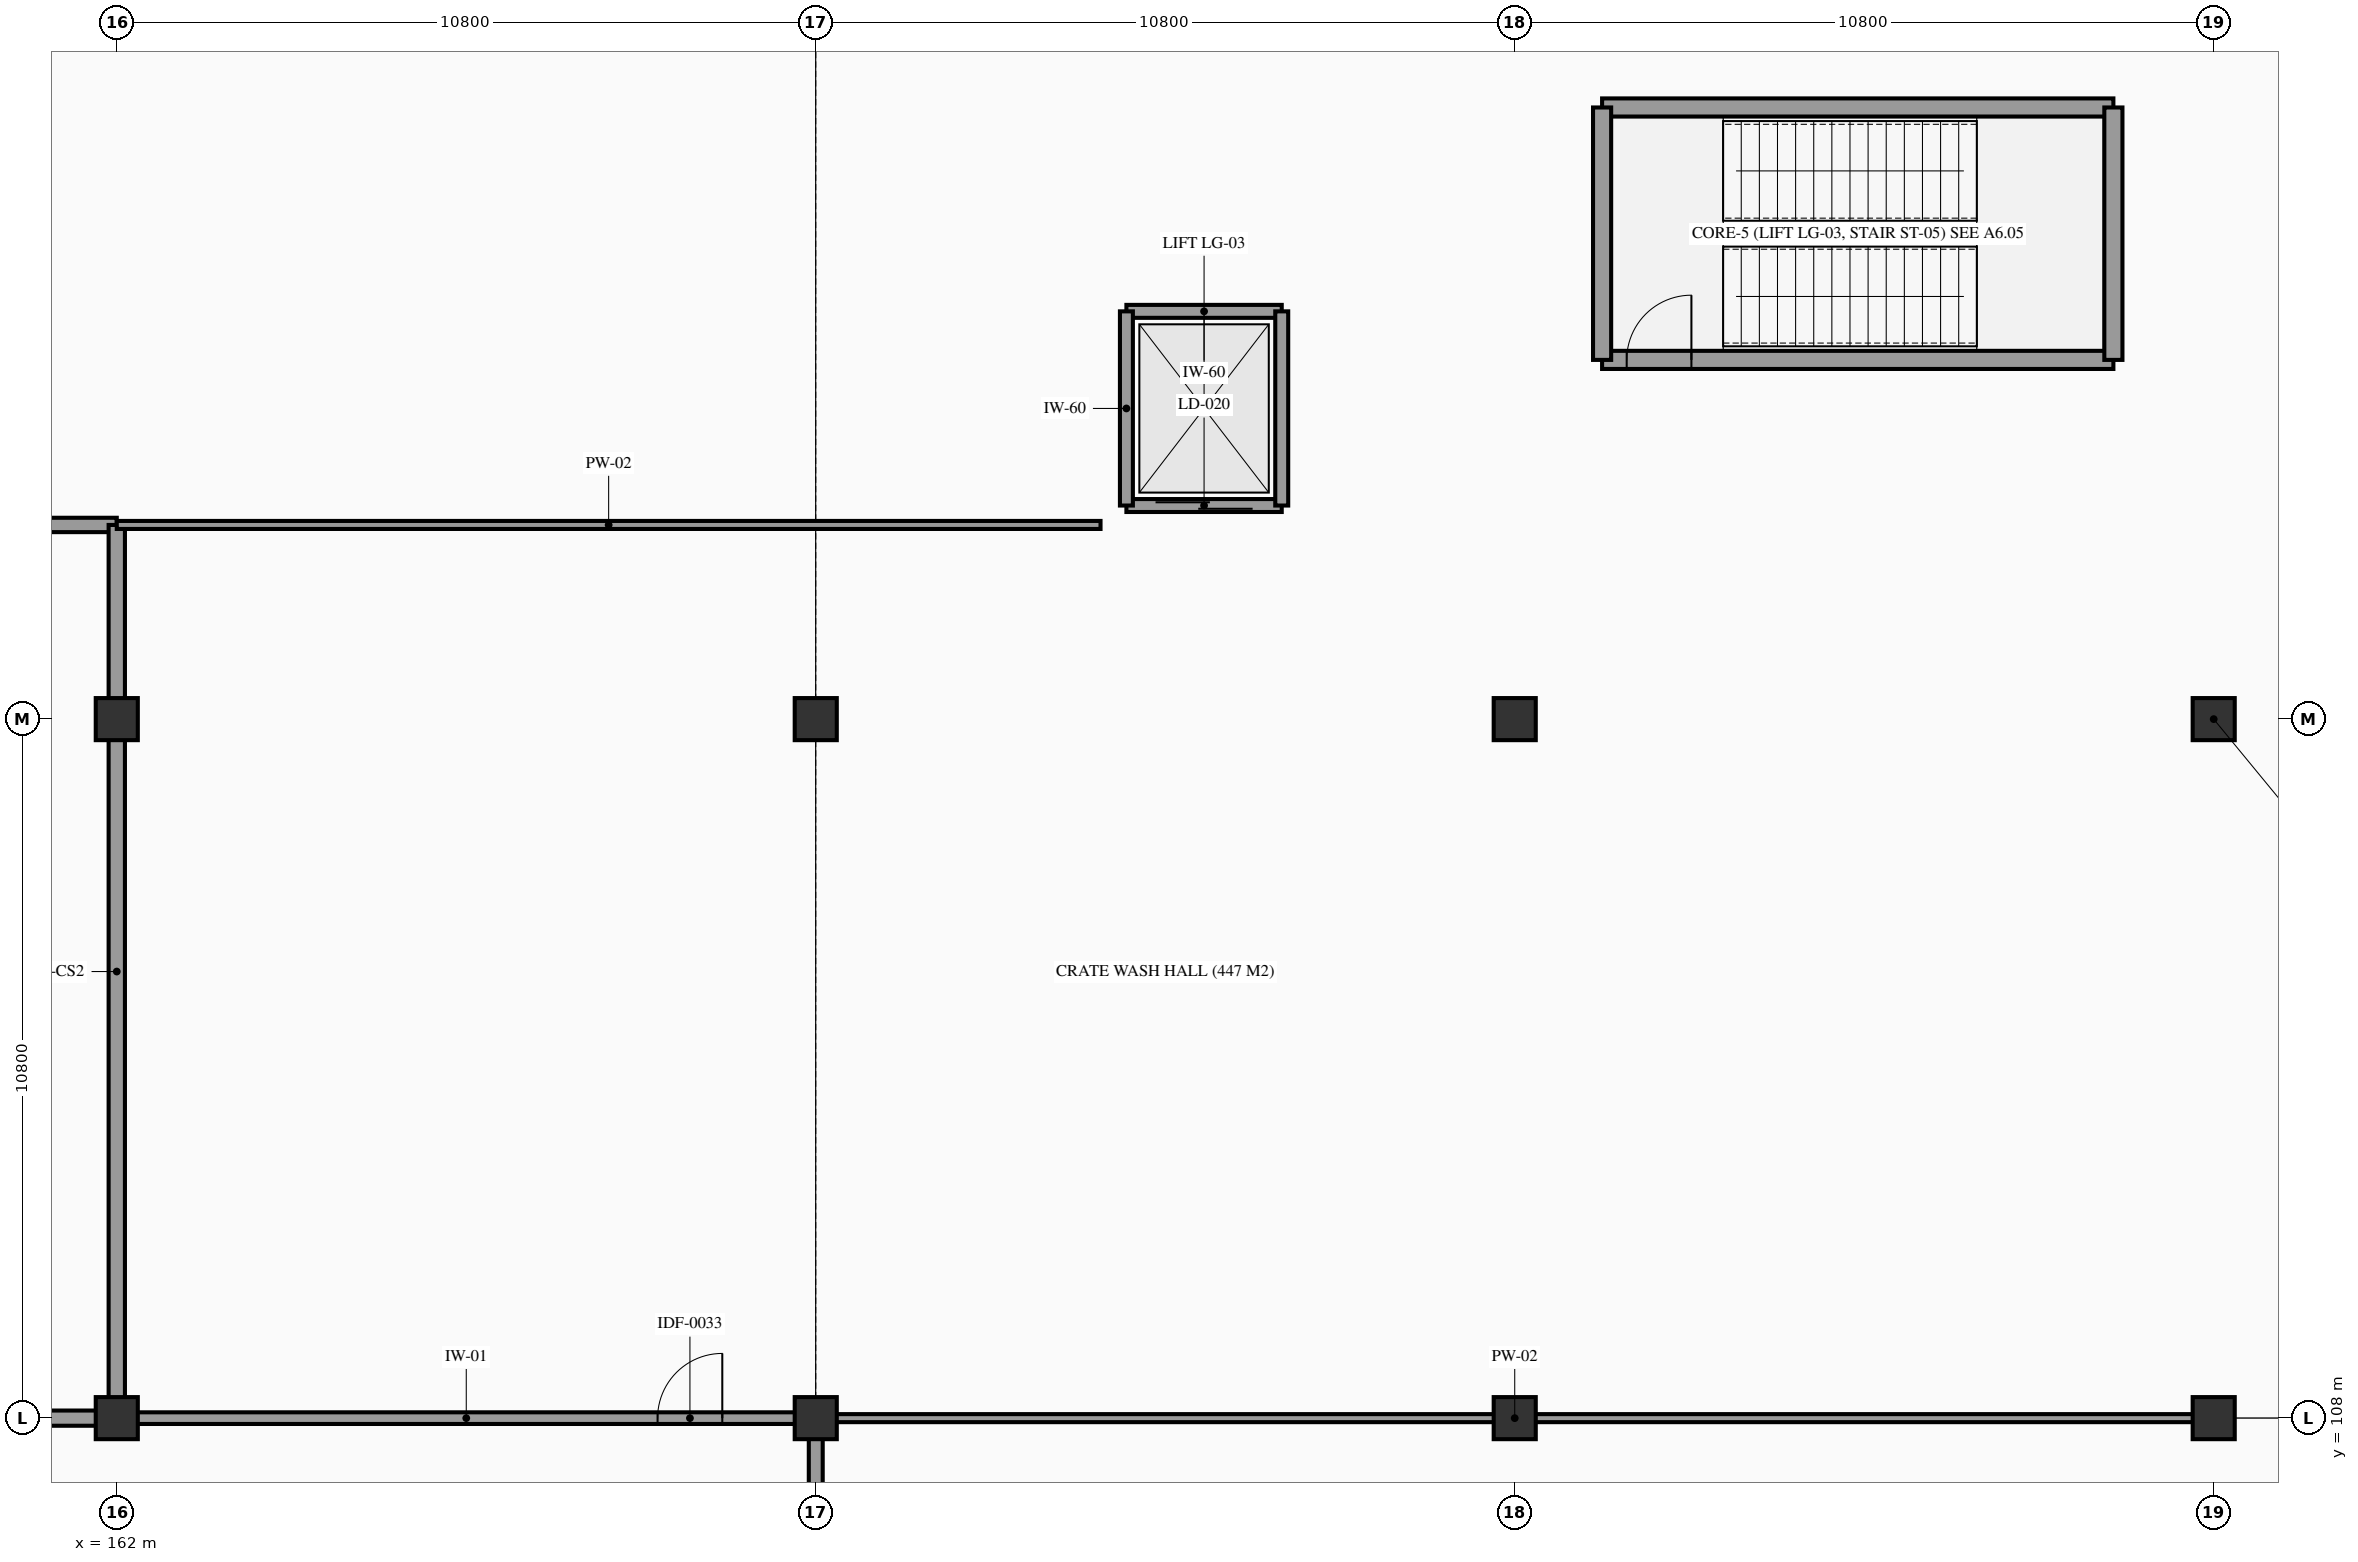
"""IFC4 building model, lengths in metres.
Left out: names, types, materials, properties, quantities, classifications, styles, units other than length and angle.
Written with IfcOpenShell. Run it as: python <this file> out.ifc"""

import sys

from ifc_helpers import new_model, si_unit, direction, frame, frame_2d, origin, origin_2d, place, context, subcontext, project, spatial, rectangle, extrude, element, fill, save


model = new_model("IFC4")
c1 = context("Model", 3, precision=1e-05, world=origin(), true_north=direction((0.0, 1.0)))
c2 = subcontext(c1, "Body", "Model", "MODEL_VIEW")
j1 = project(units=[si_unit("LENGTHUNIT", "METRE"), si_unit("PLANEANGLEUNIT", "RADIAN")], contexts=[c1])
p1 = place(None, origin())
s1 = spatial("IfcSite", under=j1, at=p1, CompositionType="ELEMENT")
p2 = place(p1, origin())
s2 = spatial("IfcBuilding", under=s1, at=p2, CompositionType="ELEMENT")
p3 = place(p2, origin())
s3 = spatial("IfcBuildingStorey", under=s2, at=p3, CompositionType="ELEMENT", Elevation=0.0)
for number, where, z_axis, x_axis in (
    (1, (162.0, 108.0, -1.2), (0.0, 0.0, 1.0), (1.0, 0.0, 0.0)),
    (2, (162.0, 118.8, -1.2), (0.0, 0.0, 1.0), (1.0, 0.0, 0.0)),
    (3, (172.8, 108.0, -1.2), (0.0, 0.0, 1.0), (1.0, 0.0, 0.0)),
    (4, (172.8, 118.8, -1.2), (0.0, 0.0, 1.0), (1.0, 0.0, 0.0)),
    (5, (183.6, 108.0, -1.2), (0.0, 0.0, 1.0), (1.0, 0.0, 0.0)),
    (6, (183.6, 118.8, -1.2), (0.0, 0.0, 1.0), (1.0, 0.0, 0.0)),
    (7, (194.4, 108.0, -1.2), (0.0, 0.0, 1.0), (1.0, 0.0, 0.0)),
    (8, (194.4, 118.8, -1.2), (0.0, 0.0, 1.0), (1.0, 0.0, 0.0)),
):
    element("IfcColumn", number, at=place(p3, frame(where, z_axis=z_axis, x_axis=x_axis)), inside=s3, PredefinedType="COLUMN", context=c2, shape_type="SweptSolid", body=[
        extrude(rectangle(XDim=0.65, YDim=0.65, at=origin_2d()), origin(), (0.0, 0.0, 1.0), 6.6),
    ])
p4 = place(p3, frame((184.95, 124.35, 0.0), z_axis=(0.0, 0.0, 1.0), x_axis=(1.0, 0.0, 0.0)))
e9 = element("IfcWall", 9, at=p4, inside=s3, PredefinedType="SHEAR", context=c2, shape_type="SweptSolid", body=[
    extrude(rectangle(XDim=7.9, YDim=0.28, at=frame_2d((3.95, 0.0))), origin(), (0.0, 0.0, 1.0), 5.4),
])
p5 = place(p4, frame((0.38, 0.0, 0.0)))
e10 = element("IfcOpeningElement", 10, at=p5, cuts=e9, PredefinedType="OPENING", context=c2, shape_type="SweptSolid", body=[
    extrude(rectangle(XDim=1.0, YDim=2.15, at=frame_2d((0.5, 1.075))), frame((0.0, 0.15, 0.0), z_axis=(0.0, -1.0, 0.0), x_axis=(1.0, 0.0, 0.0)), (0.0, 0.0, 1.0), 0.3),
])
p6 = place(p3, frame((184.95, 128.25, 0.0), z_axis=(0.0, 0.0, 1.0), x_axis=(1.0, 0.0, 0.0)))
e11 = element("IfcWall", 11, at=p6, inside=s3, PredefinedType="SHEAR", context=c2, shape_type="SweptSolid", body=[
    extrude(rectangle(XDim=7.9, YDim=0.28, at=frame_2d((3.95, 0.0))), origin(), (0.0, 0.0, 1.0), 5.4),
])
for number, where, z_axis, x_axis in (
    (12, (184.95, 124.35, 0.0), (0.0, 0.0, 1.0), (0.0, 1.0, 0.0)),
    (13, (192.85, 124.35, 0.0), (0.0, 0.0, 1.0), (0.0, 1.0, 0.0)),
):
    element("IfcWall", number, at=place(p3, frame(where, z_axis=z_axis, x_axis=x_axis)), inside=s3, PredefinedType="SHEAR", context=c2, shape_type="SweptSolid", body=[
        extrude(rectangle(XDim=3.9, YDim=0.28, at=frame_2d((1.95, 0.0))), origin(), (0.0, 0.0, 1.0), 5.4),
    ])
p7 = place(p3, frame((177.6, 122.1, 0.0), z_axis=(0.0, 0.0, 1.0), x_axis=(1.0, 0.0, 0.0)))
e14 = element("IfcWall", 14, at=p7, inside=s3, PredefinedType="SOLIDWALL", context=c2, shape_type="SweptSolid", body=[
    extrude(rectangle(XDim=2.4, YDim=0.2, at=frame_2d((1.2, 0.0))), origin(), (0.0, 0.0, 1.0), 4.22),
])
p8 = place(p7, frame((0.45, 0.0, 0.0)))
e15 = element("IfcOpeningElement", 15, at=p8, cuts=e14, PredefinedType="OPENING", context=c2, shape_type="SweptSolid", body=[
    extrude(rectangle(XDim=1.5, YDim=2.3, at=frame_2d((0.75, 1.15))), frame((0.0, 0.11, 0.0), z_axis=(0.0, -1.0, 0.0), x_axis=(1.0, 0.0, 0.0)), (0.0, 0.0, 1.0), 0.22),
])
p9 = place(p3, frame((177.6, 125.1, 0.0), z_axis=(0.0, 0.0, 1.0), x_axis=(1.0, 0.0, 0.0)))
e16 = element("IfcWall", 16, at=p9, inside=s3, PredefinedType="SOLIDWALL", context=c2, shape_type="SweptSolid", body=[
    extrude(rectangle(XDim=2.4, YDim=0.2, at=frame_2d((1.2, 0.0))), origin(), (0.0, 0.0, 1.0), 4.22),
])
for number, where, z_axis, x_axis in (
    (17, (177.6, 122.1, 0.0), (0.0, 0.0, 1.0), (0.0, 1.0, 0.0)),
    (18, (180.0, 122.1, 0.0), (0.0, 0.0, 1.0), (0.0, 1.0, 0.0)),
):
    element("IfcWall", number, at=place(p3, frame(where, z_axis=z_axis, x_axis=x_axis)), inside=s3, PredefinedType="SOLIDWALL", context=c2, shape_type="SweptSolid", body=[
        extrude(rectangle(XDim=3.0, YDim=0.2, at=frame_2d((1.5, 0.0))), origin(), (0.0, 0.0, 1.0), 4.22),
    ])
p10 = place(p3, frame((127.6, 108.0, 0.0), z_axis=(0.0, 0.0, 1.0), x_axis=(1.0, 0.0, 0.0)))
e19 = element("IfcWall", 19, at=p10, inside=s3, PredefinedType="PARTITIONING", context=c2, shape_type="SweptSolid", body=[
    extrude(rectangle(XDim=34.4, YDim=0.235, at=frame_2d((17.2, 0.0))), origin(), (0.0, 0.0, 1.0), 3.95),
])
p11 = place(p10, frame((27.098, 0.0, 0.0)))
e20 = element("IfcOpeningElement", 20, at=p11, cuts=e19, PredefinedType="OPENING", context=c2, shape_type="SweptSolid", body=[
    extrude(rectangle(XDim=2.22, YDim=2.6, at=frame_2d((1.11, 1.3))), frame((0.0, 0.127, 0.0), z_axis=(0.0, -1.0, 0.0), x_axis=(1.0, 0.0, 0.0)), (0.0, 0.0, 1.0), 0.255),
])
p12 = place(p3, frame((162.0, 108.0, 0.0), z_axis=(0.0, 0.0, 1.0), x_axis=(1.0, 0.0, 0.0)))
e21 = element("IfcWall", 21, at=p12, inside=s3, PredefinedType="PARTITIONING", context=c2, shape_type="SweptSolid", body=[
    extrude(rectangle(XDim=10.8, YDim=0.18, at=frame_2d((5.4, 0.0))), origin(), (0.0, 0.0, 1.0), 3.95),
])
p13 = place(p12, frame((8.356, 0.0, 0.0)))
e22 = element("IfcOpeningElement", 22, at=p13, cuts=e21, PredefinedType="OPENING", context=c2, shape_type="SweptSolid", body=[
    extrude(rectangle(XDim=1.0, YDim=2.15, at=frame_2d((0.5, 1.075))), frame((0.0, 0.1, 0.0), z_axis=(0.0, -1.0, 0.0), x_axis=(1.0, 0.0, 0.0)), (0.0, 0.0, 1.0), 0.2),
])
p14 = place(p3, frame((172.8, 102.6, 0.0), z_axis=(0.0, 0.0, 1.0), x_axis=(0.0, 1.0, 0.0)))
e23 = element("IfcWall", 23, at=p14, inside=s3, PredefinedType="PARTITIONING", context=c2, shape_type="SweptSolid", body=[
    extrude(rectangle(XDim=5.4, YDim=0.215, at=frame_2d((2.7, 0.0))), origin(), (0.0, 0.0, 1.0), 3.95),
])
p15 = place(p14, frame((2.15, 0.0, 0.0)))
e24 = element("IfcOpeningElement", 24, at=p15, cuts=e23, PredefinedType="OPENING", context=c2, shape_type="SweptSolid", body=[
    extrude(rectangle(XDim=1.1, YDim=2.2, at=frame_2d((0.55, 1.1))), frame((0.0, 0.117, 0.0), z_axis=(0.0, -1.0, 0.0), x_axis=(1.0, 0.0, 0.0)), (0.0, 0.0, 1.0), 0.235),
])
p16 = place(p3, frame((127.6, 121.8, 0.0), z_axis=(0.0, 0.0, 1.0), x_axis=(1.0, 0.0, 0.0)))
e25 = element("IfcWall", 25, at=p16, inside=s3, PredefinedType="PARTITIONING", context=c2, shape_type="SweptSolid", body=[
    extrude(rectangle(XDim=34.4, YDim=0.222, at=frame_2d((17.2, 0.0))), origin(), (0.0, 0.0, 1.0), 3.95),
])
p17 = place(p16, frame((29.022, 0.0, 0.0)))
e26 = element("IfcOpeningElement", 26, at=p17, cuts=e25, PredefinedType="OPENING", context=c2, shape_type="SweptSolid", body=[
    extrude(rectangle(XDim=2.5, YDim=2.7, at=frame_2d((1.25, 1.35))), frame((0.0, 0.121, 0.0), z_axis=(0.0, -1.0, 0.0), x_axis=(1.0, 0.0, 0.0)), (0.0, 0.0, 1.0), 0.242),
])
p18 = place(p3, frame((162.0, 108.0, 0.0), z_axis=(0.0, 0.0, 1.0), x_axis=(0.0, 1.0, 0.0)))
e27 = element("IfcWall", 27, at=p18, inside=s3, PredefinedType="PARTITIONING", context=c2, shape_type="SweptSolid", body=[
    extrude(rectangle(XDim=13.8, YDim=0.252, at=frame_2d((6.9, 0.0))), origin(), (0.0, 0.0, 1.0), 3.95),
])
p19 = place(p3, frame((162.0, 121.8, 0.0), z_axis=(0.0, 0.0, 1.0), x_axis=(1.0, 0.0, 0.0)))
e28 = element("IfcWall", 28, at=p19, inside=s3, PredefinedType="PARTITIONING", context=c2, shape_type="SweptSolid", body=[
    extrude(rectangle(XDim=15.2, YDim=0.124, at=frame_2d((7.6, 0.0))), origin(), (0.0, 0.0, 1.0), 3.95),
])
p20 = place(p3, frame((172.8, 108.0, 0.0), z_axis=(0.0, 0.0, 1.0), x_axis=(1.0, 0.0, 0.0)))
e29 = element("IfcWall", 29, at=p20, inside=s3, PredefinedType="PARTITIONING", context=c2, shape_type="SweptSolid", body=[
    extrude(rectangle(XDim=21.6, YDim=0.124, at=frame_2d((10.8, 0.0))), origin(), (0.0, 0.0, 1.0), 3.95),
])
p21 = place(p5, origin())
e30 = element("IfcDoor", 30, at=p21, inside=s3, OperationType="SINGLE_SWING_RIGHT", PredefinedType="DOOR", context=c2, shape_type="SweptSolid", body=[
    extrude(rectangle(XDim=1.0, YDim=2.15, at=frame_2d((0.5, 1.075))), frame((0.0, 0.025, 0.0), z_axis=(0.0, -1.0, 0.0), x_axis=(1.0, 0.0, 0.0)), (0.0, 0.0, 1.0), 0.05),
])
fill(e10, e30)
p22 = place(p8, origin())
e31 = element("IfcDoor", 31, at=p22, inside=s3, OperationType="DOUBLE_DOOR_SLIDING", PredefinedType="DOOR", context=c2, shape_type="SweptSolid", body=[
    extrude(rectangle(XDim=1.5, YDim=2.3, at=frame_2d((0.75, 1.15))), frame((0.0, 0.025, 0.0), z_axis=(0.0, -1.0, 0.0), x_axis=(1.0, 0.0, 0.0)), (0.0, 0.0, 1.0), 0.05),
])
fill(e15, e31)
p23 = place(p13, frame((1.0, 0.0, 0.0), z_axis=(0.0, 0.0, 1.0), x_axis=(-1.0, 0.0, 0.0)))
e32 = element("IfcDoor", 32, at=p23, inside=s3, OperationType="SINGLE_SWING_RIGHT", PredefinedType="DOOR", context=c2, shape_type="SweptSolid", body=[
    extrude(rectangle(XDim=1.0, YDim=2.15, at=frame_2d((0.5, 1.075))), frame((0.0, 0.025, 0.0), z_axis=(0.0, -1.0, 0.0), x_axis=(1.0, 0.0, 0.0)), (0.0, 0.0, 1.0), 0.05),
])
fill(e22, e32)
save(model, sys.argv[1])
